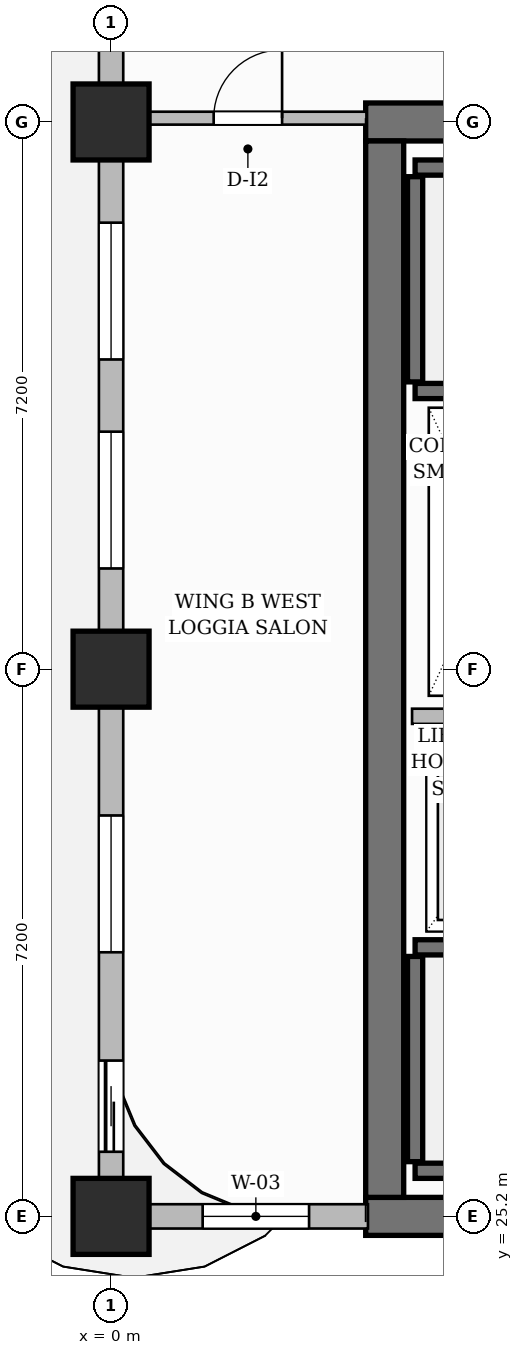
"""IFC4 building model, lengths in metres.
Left out: names, types, materials, properties, quantities, classifications, styles, units other than length and angle.
Written with IfcOpenShell. Run it as: python <this file> out.ifc"""

import sys

from ifc_helpers import new_model, si_unit, direction, frame, frame_2d, origin, origin_2d, place, context, subcontext, project, spatial, rectangle, extrude, source, transform, mapped, element, fill, save


model = new_model("IFC4")
c1 = context("Model", 3, precision=1e-05, world=origin(), true_north=direction((0.0, 1.0)))
c2 = subcontext(c1, "Body", "Model", "MODEL_VIEW")
j1 = project(units=[si_unit("LENGTHUNIT", "METRE"), si_unit("PLANEANGLEUNIT", "RADIAN")], contexts=[c1])
p1 = place(None, origin())
s1 = spatial("IfcSite", under=j1, at=p1, CompositionType="ELEMENT")
p2 = place(p1, origin())
s2 = spatial("IfcBuilding", under=s1, at=p2, CompositionType="ELEMENT")
p3 = place(p2, frame((0.0, 0.0, 169.55)))
s3 = spatial("IfcBuildingStorey", under=s2, at=p3, CompositionType="ELEMENT", Elevation=169.55)
for number, where, z_axis, x_axis in (
    (1, (3.35, 25.2, 0.0), (0.0, 0.0, 1.0), (1.0, 0.0, 0.0)),
    (2, (3.35, 39.6, 0.0), (0.0, 0.0, 1.0), (1.0, 0.0, 0.0)),
):
    element("IfcWall", number, at=place(p3, frame(where, z_axis=z_axis, x_axis=x_axis)), inside=s3, PredefinedType="SHEAR", context=c2, shape_type="SweptSolid", body=[
        extrude(rectangle(XDim=8.3, YDim=0.5, at=frame_2d((4.15, 0.0))), origin(), (0.0, 0.0, 1.0), 3.85),
    ])
p4 = place(p3, frame((3.6, 25.45, 0.0), z_axis=(0.0, 0.0, 1.0), x_axis=(0.0, 1.0, 0.0)))
e3 = element("IfcWall", 3, at=p4, inside=s3, PredefinedType="SHEAR", context=c2, shape_type="SweptSolid", body=[
    extrude(rectangle(XDim=13.9, YDim=0.5, at=frame_2d((6.95, 0.0))), origin(), (0.0, 0.0, 1.0), 3.85),
])
m1 = source(origin(), c2, "Body", "SweptSolid", [
    extrude(rectangle(XDim=1.0, YDim=1.0, at=origin_2d()), origin(), (0.0, 0.0, 1.0), 3.85),
])
for number, where, z_axis, x_axis in (
    (4, (0.0, 25.2, 0.0), (0.0, 0.0, 1.0), (1.0, 0.0, 0.0)),
    (5, (0.0, 32.4, 0.0), (0.0, 0.0, 1.0), (1.0, 0.0, 0.0)),
    (6, (0.0, 39.6, 0.0), (0.0, 0.0, 1.0), (1.0, 0.0, 0.0)),
):
    element("IfcColumn", number, at=place(p3, frame(where, z_axis=z_axis, x_axis=x_axis)), inside=s3, PredefinedType="COLUMN", context=c2, shape_type="MappedRepresentation", body=[
        mapped(m1, transform((0.0, 0.0, 0.0), scale=1.0)),
    ])
p5 = place(p3, frame((4.0, 25.8, 0.0), z_axis=(0.0, 0.0, 1.0), x_axis=(1.0, 0.0, 0.0)))
e7 = element("IfcWall", 7, at=p5, inside=s3, PredefinedType="SHEAR", context=c2, shape_type="SweptSolid", body=[
    extrude(rectangle(XDim=7.1, YDim=0.2, at=frame_2d((3.55, 0.0))), origin(), (0.0, 0.0, 1.0), 3.85),
])
p6 = place(p3, frame((4.0, 25.92, 0.0), z_axis=(0.0, 0.0, 1.0), x_axis=(0.0, 1.0, 0.0)))
e8 = element("IfcWall", 8, at=p6, inside=s3, PredefinedType="SHEAR", context=c2, shape_type="SweptSolid", body=[
    extrude(rectangle(XDim=2.7, YDim=0.2, at=frame_2d((1.35, 0.0))), origin(), (0.0, 0.0, 1.0), 3.85),
])
p7 = place(p3, frame((4.0, 28.74, 0.0), z_axis=(0.0, 0.0, 1.0), x_axis=(1.0, 0.0, 0.0)))
e9 = element("IfcWall", 9, at=p7, inside=s3, PredefinedType="SHEAR", context=c2, shape_type="SweptSolid", body=[
    extrude(rectangle(XDim=7.1, YDim=0.2, at=frame_2d((3.55, 0.0))), origin(), (0.0, 0.0, 1.0), 3.85),
])
p8 = place(p7, frame((5.815, 0.0, 0.0)))
e10 = element("IfcOpeningElement", 10, at=p8, cuts=e9, PredefinedType="OPENING", context=c2, shape_type="SweptSolid", body=[
    extrude(rectangle(XDim=1.05, YDim=2.2, at=frame_2d((0.525, 1.1))), frame((0.0, 0.11, 0.0), z_axis=(0.0, -1.0, 0.0), x_axis=(1.0, 0.0, 0.0)), (0.0, 0.0, 1.0), 0.22),
])
p9 = place(p3, frame((4.0, 39.0, 0.0), z_axis=(0.0, 0.0, 1.0), x_axis=(1.0, 0.0, 0.0)))
e11 = element("IfcWall", 11, at=p9, inside=s3, PredefinedType="SHEAR", context=c2, shape_type="SweptSolid", body=[
    extrude(rectangle(XDim=7.1, YDim=0.2, at=frame_2d((3.55, 0.0))), origin(), (0.0, 0.0, 1.0), 3.85),
])
p10 = place(p3, frame((4.0, 36.18, 0.0), z_axis=(0.0, 0.0, 1.0), x_axis=(0.0, 1.0, 0.0)))
e12 = element("IfcWall", 12, at=p10, inside=s3, PredefinedType="SHEAR", context=c2, shape_type="SweptSolid", body=[
    extrude(rectangle(XDim=2.7, YDim=0.2, at=frame_2d((1.35, 0.0))), origin(), (0.0, 0.0, 1.0), 3.85),
])
p11 = place(p3, frame((4.0, 36.06, 0.0), z_axis=(0.0, 0.0, 1.0), x_axis=(1.0, 0.0, 0.0)))
e13 = element("IfcWall", 13, at=p11, inside=s3, PredefinedType="SHEAR", context=c2, shape_type="SweptSolid", body=[
    extrude(rectangle(XDim=7.1, YDim=0.2, at=frame_2d((3.55, 0.0))), origin(), (0.0, 0.0, 1.0), 3.85),
])
p12 = place(p11, frame((5.815, 0.0, 0.0)))
e14 = element("IfcOpeningElement", 14, at=p12, cuts=e13, PredefinedType="OPENING", context=c2, shape_type="SweptSolid", body=[
    extrude(rectangle(XDim=1.05, YDim=2.2, at=frame_2d((0.525, 1.1))), frame((0.0, 0.11, 0.0), z_axis=(0.0, -1.0, 0.0), x_axis=(1.0, 0.0, 0.0)), (0.0, 0.0, 1.0), 0.22),
])
p13 = place(p3, frame((3.96, 31.78, 0.0), z_axis=(0.0, 0.0, 1.0), x_axis=(1.0, 0.0, 0.0)))
e15 = element("IfcWall", 15, at=p13, inside=s3, PredefinedType="PARTITIONING", context=c2, shape_type="SweptSolid", body=[
    extrude(rectangle(XDim=2.13, YDim=0.2, at=frame_2d((1.065, 0.0))), origin(), (0.0, 0.0, 1.0), 3.6),
])
p14 = place(p3, frame((0.24, 39.65, 0.0), z_axis=(0.0, 0.0, 1.0), x_axis=(1.0, 0.0, 0.0)))
e16 = element("IfcWall", 16, at=p14, inside=s3, PredefinedType="PARTITIONING", context=c2, shape_type="SweptSolid", body=[
    extrude(rectangle(XDim=3.12, YDim=0.17, at=frame_2d((1.56, 0.0))), origin(), (0.0, 0.0, 1.0), 3.6),
])
p15 = place(p14, frame((1.11, 0.0, 0.0)))
e17 = element("IfcOpeningElement", 17, at=p15, cuts=e16, PredefinedType="OPENING", context=c2, shape_type="SweptSolid", body=[
    extrude(rectangle(XDim=0.9, YDim=2.15, at=frame_2d((0.45, 1.075))), frame((0.0, 0.095, 0.0), z_axis=(0.0, -1.0, 0.0), x_axis=(1.0, 0.0, 0.0)), (0.0, 0.0, 1.0), 0.19),
])
p16 = place(p3, frame((0.0, 25.2, 0.0), z_axis=(0.0, 0.0, 1.0), x_axis=(1.0, 0.0, 0.0)))
e18 = element("IfcWall", 18, at=p16, inside=s3, PredefinedType="SOLIDWALL", context=c2, shape_type="SweptSolid", body=[
    extrude(rectangle(XDim=3.38, YDim=0.32, at=frame_2d((1.69, 0.0))), origin(), (0.0, 0.0, 1.0), 3.6),
])
p17 = place(p16, frame((1.205, 0.0, 0.8)))
e19 = element("IfcOpeningElement", 19, at=p17, cuts=e18, PredefinedType="OPENING", context=c2, shape_type="SweptSolid", body=[
    extrude(rectangle(XDim=1.4, YDim=1.85, at=frame_2d((0.7, 0.925))), frame((0.0, 0.17, 0.0), z_axis=(0.0, -1.0, 0.0), x_axis=(1.0, 0.0, 0.0)), (0.0, 0.0, 1.0), 0.34),
])
p18 = place(p3, frame((0.0, 25.25, 0.0), z_axis=(0.0, 0.0, 1.0), x_axis=(0.0, 1.0, 0.0)))
e20 = element("IfcWall", 20, at=p18, inside=s3, PredefinedType="SOLIDWALL", context=c2, shape_type="SweptSolid", body=[
    extrude(rectangle(XDim=21.5, YDim=0.32, at=frame_2d((10.75, 0.0))), origin(), (0.0, 0.0, 1.0), 3.085),
])
p19 = place(p18, frame((18.357, 0.0, 0.0)))
e21 = element("IfcOpeningElement", 21, at=p19, cuts=e20, PredefinedType="OPENING", context=c2, shape_type="SweptSolid", body=[
    extrude(rectangle(XDim=1.2, YDim=2.2, at=frame_2d((0.6, 1.1))), frame((0.0, 0.17, 0.0), z_axis=(0.0, -1.0, 0.0), x_axis=(1.0, 0.0, 0.0)), (0.0, 0.0, 1.0), 0.34),
])
p20 = place(p18, frame((0.8, 0.0, 0.0)))
e22 = element("IfcOpeningElement", 22, at=p20, cuts=e20, PredefinedType="OPENING", context=c2, shape_type="SweptSolid", body=[
    extrude(rectangle(XDim=1.2, YDim=2.2, at=frame_2d((0.6, 1.1))), frame((0.0, 0.17, 0.0), z_axis=(0.0, -1.0, 0.0), x_axis=(1.0, 0.0, 0.0)), (0.0, 0.0, 1.0), 0.34),
])
p21 = place(p18, frame((3.425, 0.0, 0.8)))
e23 = element("IfcOpeningElement", 23, at=p21, cuts=e20, PredefinedType="OPENING", context=c2, shape_type="SweptSolid", body=[
    extrude(rectangle(XDim=1.8, YDim=1.85, at=frame_2d((0.9, 0.925))), frame((0.0, 0.17, 0.0), z_axis=(0.0, -1.0, 0.0), x_axis=(1.0, 0.0, 0.0)), (0.0, 0.0, 1.0), 0.34),
])
p22 = place(p18, frame((8.475, 0.0, 0.8)))
e24 = element("IfcOpeningElement", 24, at=p22, cuts=e20, PredefinedType="OPENING", context=c2, shape_type="SweptSolid", body=[
    extrude(rectangle(XDim=1.8, YDim=1.85, at=frame_2d((0.9, 0.925))), frame((0.0, 0.17, 0.0), z_axis=(0.0, -1.0, 0.0), x_axis=(1.0, 0.0, 0.0)), (0.0, 0.0, 1.0), 0.34),
])
p23 = place(p18, frame((11.225, 0.0, 0.8)))
e25 = element("IfcOpeningElement", 25, at=p23, cuts=e20, PredefinedType="OPENING", context=c2, shape_type="SweptSolid", body=[
    extrude(rectangle(XDim=1.8, YDim=1.85, at=frame_2d((0.9, 0.925))), frame((0.0, 0.17, 0.0), z_axis=(0.0, -1.0, 0.0), x_axis=(1.0, 0.0, 0.0)), (0.0, 0.0, 1.0), 0.34),
])
p24 = place(p18, frame((16.632, 0.0, 0.8)))
e26 = element("IfcOpeningElement", 26, at=p24, cuts=e20, PredefinedType="OPENING", context=c2, shape_type="SweptSolid", body=[
    extrude(rectangle(XDim=1.15, YDim=1.8, at=frame_2d((0.575, 0.9))), frame((0.0, 0.17, 0.0), z_axis=(0.0, -1.0, 0.0), x_axis=(1.0, 0.0, 0.0)), (0.0, 0.0, 1.0), 0.34),
])
m2 = source(origin(), c2, "Body", "SweptSolid", [
    extrude(rectangle(XDim=0.9, YDim=2.15, at=frame_2d((0.45, 1.075))), frame((0.0, 0.025, 0.0), z_axis=(0.0, -1.0, 0.0), x_axis=(1.0, 0.0, 0.0)), (0.0, 0.0, 1.0), 0.05),
])
p25 = place(p15, origin())
e27 = element("IfcDoor", 27, at=p25, inside=s3, OperationType="SINGLE_SWING_RIGHT", PredefinedType="DOOR", context=c2, shape_type="MappedRepresentation", body=[
    mapped(m2, transform((0.0, 0.0, 0.0), scale=1.0)),
])
fill(e17, e27)
m3 = source(origin(), c2, "Body", "SweptSolid", [
    extrude(rectangle(XDim=1.2, YDim=2.2, at=frame_2d((0.6, 1.1))), frame((0.0, 0.025, 0.0), z_axis=(0.0, -1.0, 0.0), x_axis=(1.0, 0.0, 0.0)), (0.0, 0.0, 1.0), 0.05),
])
p26 = place(p20, origin())
e28 = element("IfcDoor", 28, at=p26, inside=s3, OperationType="SLIDING_TO_LEFT", PredefinedType="DOOR", context=c2, shape_type="MappedRepresentation", body=[
    mapped(m3, transform((0.0, 0.0, 0.0), scale=1.0)),
])
fill(e22, e28)
m4 = source(origin(), c2, "Body", "SweptSolid", [
    extrude(rectangle(XDim=1.4, YDim=1.85, at=frame_2d((0.7, 0.925))), frame((0.0, 0.03, 0.0), z_axis=(0.0, -1.0, 0.0), x_axis=(1.0, 0.0, 0.0)), (0.0, 0.0, 1.0), 0.06),
])
p27 = place(p17, origin())
e29 = element("IfcWindow", 29, at=p27, inside=s3, PartitioningType="SINGLE_PANEL", PredefinedType="WINDOW", context=c2, shape_type="MappedRepresentation", body=[
    mapped(m4, transform((0.0, 0.0, 0.0), scale=1.0)),
])
fill(e19, e29)
m5 = source(origin(), c2, "Body", "SweptSolid", [
    extrude(rectangle(XDim=1.8, YDim=1.85, at=frame_2d((0.9, 0.925))), frame((0.0, 0.03, 0.0), z_axis=(0.0, -1.0, 0.0), x_axis=(1.0, 0.0, 0.0)), (0.0, 0.0, 1.0), 0.06),
])
p28 = place(p21, origin())
e30 = element("IfcWindow", 30, at=p28, inside=s3, PartitioningType="DOUBLE_PANEL_VERTICAL", PredefinedType="WINDOW", context=c2, shape_type="MappedRepresentation", body=[
    mapped(m5, transform((0.0, 0.0, 0.0), scale=1.0)),
])
fill(e23, e30)
p29 = place(p22, origin())
e31 = element("IfcWindow", 31, at=p29, inside=s3, PartitioningType="DOUBLE_PANEL_VERTICAL", PredefinedType="WINDOW", context=c2, shape_type="MappedRepresentation", body=[
    mapped(m5, transform((0.0, 0.0, 0.0), scale=1.0)),
])
fill(e24, e31)
p30 = place(p23, origin())
e32 = element("IfcWindow", 32, at=p30, inside=s3, PartitioningType="DOUBLE_PANEL_VERTICAL", PredefinedType="WINDOW", context=c2, shape_type="MappedRepresentation", body=[
    mapped(m5, transform((0.0, 0.0, 0.0), scale=1.0)),
])
fill(e25, e32)
save(model, sys.argv[1])
